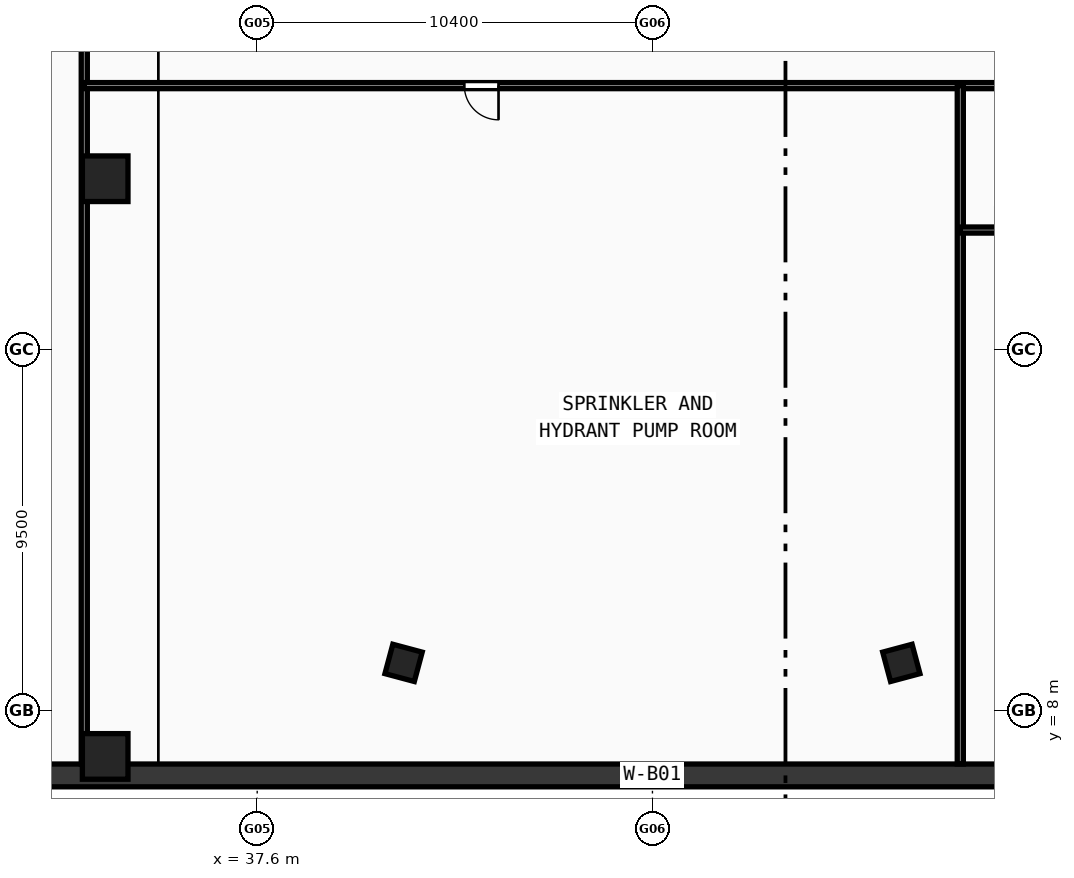
"""IFC4 building model, lengths in metres.
Left out: names, types, materials, properties, quantities, classifications, styles, units other than length and angle.
Written with IfcOpenShell. Run it as: python <this file> out.ifc"""

import sys

from ifc_helpers import new_model, si_unit, direction, frame, frame_2d, origin, origin_2d, place, context, subcontext, project, spatial, rectangle, hollow_rectangle, extrude, source, transform, mapped, element, fill, save


model = new_model("IFC4")
c1 = context("Model", 3, precision=1e-05, world=origin(), true_north=direction((0.0, 1.0)))
c2 = subcontext(c1, "Body", "Model", "MODEL_VIEW")
j1 = project(units=[si_unit("LENGTHUNIT", "METRE"), si_unit("PLANEANGLEUNIT", "RADIAN")], contexts=[c1])
p1 = place(None, origin())
s1 = spatial("IfcSite", under=j1, at=p1, CompositionType="ELEMENT")
p2 = place(p1, origin())
s2 = spatial("IfcBuilding", under=s1, at=p2, CompositionType="ELEMENT")
p3 = place(p2, frame((0.0, 0.0, -10.0)))
s3 = spatial("IfcBuildingStorey", under=s2, at=p3, CompositionType="ELEMENT", Elevation=-10.0)
p4 = place(p3, frame((4.0, 6.3, -0.6), z_axis=(0.0, 0.0, 1.0), x_axis=(1.0, 0.0, 0.0)))
e1 = element("IfcWall", 1, at=p4, inside=s3, PredefinedType="SHEAR", context=c2, shape_type="SweptSolid", body=[
    extrude(rectangle(XDim=88.0, YDim=0.6, at=frame_2d((44.0, 0.0))), origin(), (0.0, 0.0, 1.0), 5.5),
])
m1 = source(origin(), c2, "Body", "SweptSolid", [
    extrude(hollow_rectangle(XDim=1.2, YDim=1.2, WallThickness=0.05, at=origin_2d()), origin(), (0.0, 0.0, 1.0), 5.5),
])
for number, where, z_axis, x_axis in (
    (2, (33.6, 6.8, -0.6), (0.0, 0.0, 1.0), (1.0, 0.0, 0.0)),
    (3, (33.6, 22.0, -0.6), (0.0, 0.0, 1.0), (1.0, 0.0, 0.0)),
):
    element("IfcColumn", number, at=place(p3, frame(where, z_axis=z_axis, x_axis=x_axis)), inside=s3, PredefinedType="COLUMN", context=c2, shape_type="MappedRepresentation", body=[
        mapped(m1, transform((0.0, 0.0, 0.0), scale=1.0)),
    ])
m2 = source(origin(), c2, "Body", "SweptSolid", [
    extrude(hollow_rectangle(XDim=0.8, YDim=0.8, WallThickness=0.032, at=origin_2d()), origin(), (0.0, 0.0, 1.0), 5.5),
])
for number, where, z_axis, x_axis in (
    (4, (41.452, 9.261, -0.6), (0.0, 0.0, 1.0), (0.966, -0.259, 0.0)),
    (5, (54.548, 9.261, -0.6), (0.0, 0.0, 1.0), (0.966, 0.259, 0.0)),
):
    element("IfcColumn", number, at=place(p3, frame(where, z_axis=z_axis, x_axis=x_axis)), inside=s3, PredefinedType="COLUMN", context=c2, shape_type="MappedRepresentation", body=[
        mapped(m2, transform((0.0, 0.0, 0.0), scale=1.0)),
    ])
p5 = place(p3, frame((33.05, 6.6, 0.0), z_axis=(0.0, 0.0, 1.0), x_axis=(0.0, 1.0, 0.0)))
e6 = element("IfcWall", 6, at=p5, inside=s3, PredefinedType="PARTITIONING", context=c2, shape_type="SweptSolid", body=[
    extrude(rectangle(XDim=32.62, YDim=0.16, at=frame_2d((16.31, 0.0))), origin(), (0.0, 0.0, 1.0), 4.0),
])
p6 = place(p5, frame((24.5, 0.0, 0.0)))
e7 = element("IfcOpeningElement", 7, at=p6, cuts=e6, PredefinedType="OPENING", context=c2, shape_type="SweptSolid", body=[
    extrude(rectangle(XDim=0.9, YDim=2.1, at=frame_2d((0.45, 1.05))), frame((0.0, 0.09, 0.0), z_axis=(0.0, -1.0, 0.0), x_axis=(1.0, 0.0, 0.0)), (0.0, 0.0, 1.0), 0.18),
])
p7 = place(p3, frame((33.05, 24.45, 0.0), z_axis=(0.0, 0.0, 1.0), x_axis=(1.0, 0.0, 0.0)))
e8 = element("IfcWall", 8, at=p7, inside=s3, PredefinedType="PARTITIONING", context=c2, shape_type="SweptSolid", body=[
    extrude(rectangle(XDim=29.9, YDim=0.16, at=frame_2d((14.95, 0.0))), origin(), (0.0, 0.0, 1.0), 4.0),
])
p8 = place(p7, frame((10.0, 0.0, 0.0)))
e9 = element("IfcOpeningElement", 9, at=p8, cuts=e8, PredefinedType="OPENING", context=c2, shape_type="SweptSolid", body=[
    extrude(rectangle(XDim=0.9, YDim=2.1, at=frame_2d((0.45, 1.05))), frame((0.0, 0.09, 0.0), z_axis=(0.0, -1.0, 0.0), x_axis=(1.0, 0.0, 0.0)), (0.0, 0.0, 1.0), 0.18),
])
p9 = place(p7, frame((24.8, 0.0, 0.0)))
e10 = element("IfcOpeningElement", 10, at=p9, cuts=e8, PredefinedType="OPENING", context=c2, shape_type="SweptSolid", body=[
    extrude(rectangle(XDim=0.94, YDim=2.1, at=frame_2d((0.47, 1.05))), frame((0.0, 0.09, 0.0), z_axis=(0.0, -1.0, 0.0), x_axis=(1.0, 0.0, 0.0)), (0.0, 0.0, 1.0), 0.18),
])
p10 = place(p7, frame((28.1, 0.0, 0.0)))
e11 = element("IfcOpeningElement", 11, at=p10, cuts=e8, PredefinedType="OPENING", context=c2, shape_type="SweptSolid", body=[
    extrude(rectangle(XDim=0.9, YDim=2.1, at=frame_2d((0.45, 1.05))), frame((0.0, 0.09, 0.0), z_axis=(0.0, -1.0, 0.0), x_axis=(1.0, 0.0, 0.0)), (0.0, 0.0, 1.0), 0.18),
])
p11 = place(p3, frame((56.1, 6.6, 0.0), z_axis=(0.0, 0.0, 1.0), x_axis=(0.0, 1.0, 0.0)))
e12 = element("IfcWall", 12, at=p11, inside=s3, PredefinedType="PARTITIONING", context=c2, shape_type="SweptSolid", body=[
    extrude(rectangle(XDim=17.85, YDim=0.16, at=frame_2d((8.925, 0.0))), origin(), (0.0, 0.0, 1.0), 4.0),
])
p12 = place(p3, frame((56.1, 20.65, 0.0), z_axis=(0.0, 0.0, 1.0), x_axis=(1.0, 0.0, 0.0)))
e13 = element("IfcWall", 13, at=p12, inside=s3, PredefinedType="PARTITIONING", context=c2, shape_type="SweptSolid", body=[
    extrude(rectangle(XDim=4.7, YDim=0.16, at=frame_2d((2.35, 0.0))), origin(), (0.0, 0.0, 1.0), 4.9),
])
m3 = source(origin(), c2, "Body", "SweptSolid", [
    extrude(rectangle(XDim=0.9, YDim=2.1, at=frame_2d((0.45, 1.05))), frame((0.0, 0.025, 0.0), z_axis=(0.0, -1.0, 0.0), x_axis=(1.0, 0.0, 0.0)), (0.0, 0.0, 1.0), 0.05),
])
p13 = place(p8, frame((0.9, 0.0, 0.0), z_axis=(0.0, 0.0, 1.0), x_axis=(-1.0, 0.0, 0.0)))
e14 = element("IfcDoor", 14, at=p13, inside=s3, OperationType="SINGLE_SWING_LEFT", PredefinedType="DOOR", context=c2, shape_type="MappedRepresentation", body=[
    mapped(m3, transform((0.0, 0.0, 0.0), scale=1.0)),
])
fill(e9, e14)
save(model, sys.argv[1])
